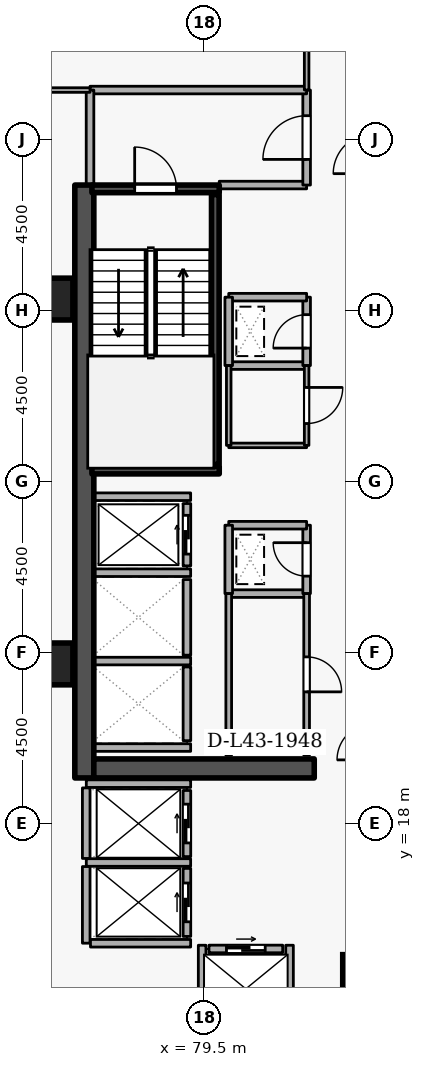
"""IFC4 building model, lengths in metres.
Left out: names, types, materials, properties, quantities, classifications, styles, units other than length and angle.
Written with IfcOpenShell. Run it as: python <this file> out.ifc"""

import sys

from ifc_helpers import new_model, si_unit, direction, frame, frame_2d, origin, origin_2d, place, context, subcontext, project, spatial, rectangle, extrude, element, fill, save


model = new_model("IFC4")
c1 = context("Model", 3, precision=1e-05, world=origin(), true_north=direction((0.0, 1.0)))
c2 = subcontext(c1, "Body", "Model", "MODEL_VIEW")
j1 = project(units=[si_unit("LENGTHUNIT", "METRE"), si_unit("PLANEANGLEUNIT", "RADIAN")], contexts=[c1])
p1 = place(None, origin())
s1 = spatial("IfcSite", under=j1, at=p1, CompositionType="ELEMENT")
p2 = place(p1, origin())
s2 = spatial("IfcBuilding", under=s1, at=p2, CompositionType="ELEMENT")
p3 = place(p2, frame((0.0, 0.0, 163.5)))
s3 = spatial("IfcBuildingStorey", under=s2, at=p3, CompositionType="ELEMENT", Elevation=163.5)
p4 = place(p3, frame((76.35, 19.2, 0.0), z_axis=(0.0, 0.0, 1.0), x_axis=(0.0, 1.0, 0.0)))
e1 = element("IfcWall", 1, at=p4, inside=s3, PredefinedType="SHEAR", context=c2, shape_type="SweptSolid", body=[
    extrude(rectangle(XDim=15.6, YDim=0.5, at=frame_2d((7.8, 0.0))), origin(), (0.0, 0.0, 1.0), 3.6),
])
p5 = place(p3, frame((76.6, 19.45, 0.0), z_axis=(0.0, 0.0, 1.0), x_axis=(1.0, 0.0, 0.0)))
e2 = element("IfcWall", 2, at=p5, inside=s3, PredefinedType="SHEAR", context=c2, shape_type="SweptSolid", body=[
    extrude(rectangle(XDim=5.8, YDim=0.5, at=frame_2d((2.9, 0.0))), origin(), (0.0, 0.0, 1.0), 3.6),
])
for number, where, z_axis, x_axis in (
    (3, (83.7, 14.0, 0.0), (0.0, 0.0, 1.0), (1.0, 0.0, 0.0)),
    (4, (75.5, 22.2, 0.0), (0.0, 0.0, 1.0), (1.0, 0.0, 0.0)),
    (5, (75.5, 31.8, 0.0), (0.0, 0.0, 1.0), (1.0, 0.0, 0.0)),
):
    element("IfcColumn", number, at=place(p3, frame(where, z_axis=z_axis, x_axis=x_axis)), inside=s3, PredefinedType="COLUMN", context=c2, shape_type="SweptSolid", body=[
        extrude(rectangle(XDim=1.1, YDim=1.1, at=origin_2d()), origin(), (0.0, 0.0, 1.0), 3.6),
    ])
p6 = place(p3, frame((79.05, 24.78, 0.0), z_axis=(0.0, 0.0, 1.0), x_axis=(0.0, 1.0, 0.0)))
e6 = element("IfcWall", 6, at=p6, inside=s3, PredefinedType="STANDARD", context=c2, shape_type="SweptSolid", body=[
    extrude(rectangle(XDim=1.64, YDim=0.2, at=frame_2d((0.82, 0.0))), origin(), (0.0, 0.0, 1.0), 3.34),
])
p7 = place(p6, frame((0.31, 0.0, 0.0)))
e7 = element("IfcOpeningElement", 7, at=p7, cuts=e6, PredefinedType="OPENING", context=c2, shape_type="SweptSolid", body=[
    extrude(rectangle(XDim=1.02, YDim=2.06, at=frame_2d((0.51, 1.03))), frame((0.0, 0.11, 0.0), z_axis=(0.0, -1.0, 0.0), x_axis=(1.0, 0.0, 0.0)), (0.0, 0.0, 1.0), 0.22),
])
p8 = place(p3, frame((79.05, 22.43, 0.0), z_axis=(0.0, 0.0, 1.0), x_axis=(0.0, 1.0, 0.0)))
e8 = element("IfcWall", 8, at=p8, inside=s3, PredefinedType="STANDARD", context=c2, shape_type="SweptSolid", body=[
    extrude(rectangle(XDim=1.99, YDim=0.2, at=frame_2d((0.995, 0.0))), origin(), (0.0, 0.0, 1.0), 3.34),
])
p9 = place(p3, frame((79.05, 20.18, 0.0), z_axis=(0.0, 0.0, 1.0), x_axis=(0.0, 1.0, 0.0)))
e9 = element("IfcWall", 9, at=p9, inside=s3, PredefinedType="STANDARD", context=c2, shape_type="SweptSolid", body=[
    extrude(rectangle(XDim=1.94, YDim=0.2, at=frame_2d((0.97, 0.0))), origin(), (0.0, 0.0, 1.0), 3.34),
])
p10 = place(p3, frame((79.05, 17.13, 0.0), z_axis=(0.0, 0.0, 1.0), x_axis=(0.0, 1.0, 0.0)))
e10 = element("IfcWall", 10, at=p10, inside=s3, PredefinedType="STANDARD", context=c2, shape_type="SweptSolid", body=[
    extrude(rectangle(XDim=1.74, YDim=0.2, at=frame_2d((0.87, 0.0))), origin(), (0.0, 0.0, 1.0), 3.34),
])
p11 = place(p10, frame((0.36, 0.0, 0.0)))
e11 = element("IfcOpeningElement", 11, at=p11, cuts=e10, PredefinedType="OPENING", context=c2, shape_type="SweptSolid", body=[
    extrude(rectangle(XDim=1.02, YDim=2.06, at=frame_2d((0.51, 1.03))), frame((0.0, 0.11, 0.0), z_axis=(0.0, -1.0, 0.0), x_axis=(1.0, 0.0, 0.0)), (0.0, 0.0, 1.0), 0.22),
])
p12 = place(p3, frame((79.05, 15.03, 0.0), z_axis=(0.0, 0.0, 1.0), x_axis=(0.0, 1.0, 0.0)))
e12 = element("IfcWall", 12, at=p12, inside=s3, PredefinedType="STANDARD", context=c2, shape_type="SweptSolid", body=[
    extrude(rectangle(XDim=1.79, YDim=0.2, at=frame_2d((0.895, 0.0))), origin(), (0.0, 0.0, 1.0), 3.34),
])
p13 = place(p12, frame((0.385, 0.0, 0.0)))
e13 = element("IfcOpeningElement", 13, at=p13, cuts=e12, PredefinedType="OPENING", context=c2, shape_type="SweptSolid", body=[
    extrude(rectangle(XDim=1.02, YDim=2.06, at=frame_2d((0.51, 1.03))), frame((0.0, 0.11, 0.0), z_axis=(0.0, -1.0, 0.0), x_axis=(1.0, 0.0, 0.0)), (0.0, 0.0, 1.0), 0.22),
])
p14 = place(p3, frame((79.63, 14.7, 0.0), z_axis=(0.0, 0.0, 1.0), x_axis=(1.0, 0.0, 0.0)))
e14 = element("IfcWall", 14, at=p14, inside=s3, PredefinedType="STANDARD", context=c2, shape_type="SweptSolid", body=[
    extrude(rectangle(XDim=1.94, YDim=0.2, at=frame_2d((0.97, 0.0))), origin(), (0.0, 0.0, 1.0), 3.34),
])
p15 = place(p14, frame((0.46, 0.0, 0.0)))
e15 = element("IfcOpeningElement", 15, at=p15, cuts=e14, PredefinedType="OPENING", context=c2, shape_type="SweptSolid", body=[
    extrude(rectangle(XDim=1.02, YDim=2.06, at=frame_2d((0.51, 1.03))), frame((0.0, 0.11, 0.0), z_axis=(0.0, -1.0, 0.0), x_axis=(1.0, 0.0, 0.0)), (0.0, 0.0, 1.0), 0.22),
])
for number, where, z_axis, x_axis in (
    (16, (76.612, 26.6, 0.0), (0.0, 0.0, 1.0), (1.0, 0.0, 0.0)),
    (17, (76.612, 24.6, 0.0), (0.0, 0.0, 1.0), (1.0, 0.0, 0.0)),
    (18, (76.612, 22.275, 0.0), (0.0, 0.0, 1.0), (1.0, 0.0, 0.0)),
    (19, (76.612, 20.0, 0.0), (0.0, 0.0, 1.0), (1.0, 0.0, 0.0)),
):
    element("IfcWall", number, at=place(p3, frame(where, z_axis=z_axis, x_axis=x_axis)), inside=s3, PredefinedType="STANDARD", context=c2, shape_type="SweptSolid", body=[
        extrude(rectangle(XDim=2.536, YDim=0.2, at=frame_2d((1.268, 0.0))), origin(), (0.0, 0.0, 1.0), 3.34),
    ])
p16 = place(p3, frame((76.402, 19.05, 0.0), z_axis=(0.0, 0.0, 1.0), x_axis=(1.0, 0.0, 0.0)))
e20 = element("IfcWall", 20, at=p16, inside=s3, PredefinedType="STANDARD", context=c2, shape_type="SweptSolid", body=[
    extrude(rectangle(XDim=2.746, YDim=0.2, at=frame_2d((1.373, 0.0))), origin(), (0.0, 0.0, 1.0), 2.545),
])
p17 = place(p3, frame((76.402, 16.975, 0.0), z_axis=(0.0, 0.0, 1.0), x_axis=(1.0, 0.0, 0.0)))
e21 = element("IfcWall", 21, at=p17, inside=s3, PredefinedType="STANDARD", context=c2, shape_type="SweptSolid", body=[
    extrude(rectangle(XDim=2.746, YDim=0.2, at=frame_2d((1.373, 0.0))), origin(), (0.0, 0.0, 1.0), 3.34),
])
p18 = place(p3, frame((76.4, 14.852, 0.0), z_axis=(0.0, 0.0, 1.0), x_axis=(0.0, 1.0, 0.0)))
e22 = element("IfcWall", 22, at=p18, inside=s3, PredefinedType="STANDARD", context=c2, shape_type="SweptSolid", body=[
    extrude(rectangle(XDim=2.016, YDim=0.2, at=frame_2d((1.008, 0.0))), origin(), (0.0, 0.0, 1.0), 3.34),
])
p19 = place(p3, frame((76.4, 17.082, 0.0), z_axis=(0.0, 0.0, 1.0), x_axis=(0.0, 1.0, 0.0)))
e23 = element("IfcWall", 23, at=p19, inside=s3, PredefinedType="STANDARD", context=c2, shape_type="SweptSolid", body=[
    extrude(rectangle(XDim=1.856, YDim=0.2, at=frame_2d((0.928, 0.0))), origin(), (0.0, 0.0, 1.0), 3.34),
])
p20 = place(p3, frame((76.512, 14.85, 0.0), z_axis=(0.0, 0.0, 1.0), x_axis=(1.0, 0.0, 0.0)))
e24 = element("IfcWall", 24, at=p20, inside=s3, PredefinedType="STANDARD", context=c2, shape_type="SweptSolid", body=[
    extrude(rectangle(XDim=2.636, YDim=0.2, at=frame_2d((1.318, 0.0))), origin(), (0.0, 0.0, 1.0), 3.34),
])
for number, where, z_axis, x_axis in (
    (25, (81.75, 12.612, 0.0), (0.0, 0.0, 1.0), (0.0, 1.0, 0.0)),
    (26, (79.45, 12.612, 0.0), (0.0, 0.0, 1.0), (0.0, 1.0, 0.0)),
):
    element("IfcWall", number, at=place(p3, frame(where, z_axis=z_axis, x_axis=x_axis)), inside=s3, PredefinedType="STANDARD", context=c2, shape_type="SweptSolid", body=[
        extrude(rectangle(XDim=2.186, YDim=0.2, at=frame_2d((1.093, 0.0))), origin(), (0.0, 0.0, 1.0), 3.34),
    ])
p21 = place(p3, frame((76.55, 34.7, 0.0), z_axis=(0.0, 0.0, 1.0), x_axis=(1.0, 0.0, 0.0)))
e27 = element("IfcWall", 27, at=p21, inside=s3, PredefinedType="SHEAR", context=c2, shape_type="SweptSolid", body=[
    extrude(rectangle(XDim=3.35, YDim=0.2, at=frame_2d((1.675, 0.0))), origin(), (0.0, 0.0, 1.0), 3.6),
])
p22 = place(p21, frame((1.125, 0.0, 0.0)))
e28 = element("IfcOpeningElement", 28, at=p22, cuts=e27, PredefinedType="OPENING", context=c2, shape_type="SweptSolid", body=[
    extrude(rectangle(XDim=1.1, YDim=2.1, at=frame_2d((0.55, 1.05))), frame((0.0, 0.11, 0.0), z_axis=(0.0, -1.0, 0.0), x_axis=(1.0, 0.0, 0.0)), (0.0, 0.0, 1.0), 0.22),
])
p23 = place(p3, frame((79.9, 27.3, 0.0), z_axis=(0.0, 0.0, 1.0), x_axis=(-1.0, 0.0, 0.0)))
e29 = element("IfcWall", 29, at=p23, inside=s3, PredefinedType="SHEAR", context=c2, shape_type="SweptSolid", body=[
    extrude(rectangle(XDim=3.35, YDim=0.2, at=frame_2d((1.675, 0.0))), origin(), (0.0, 0.0, 1.0), 3.6),
])
p24 = place(p3, frame((79.797, 27.45, 0.0), z_axis=(0.0, 0.0, 1.0), x_axis=(0.0, 1.0, 0.0)))
e30 = element("IfcWall", 30, at=p24, inside=s3, PredefinedType="SHEAR", context=c2, shape_type="SweptSolid", body=[
    extrude(rectangle(XDim=7.1, YDim=0.2, at=frame_2d((3.55, 0.0))), origin(), (0.0, 0.0, 1.0), 3.6),
])
p25 = place(p3, frame((79.9, 34.8, 0.0), z_axis=(0.0, 0.0, 1.0), x_axis=(1.0, 0.0, 0.0)))
e31 = element("IfcWall", 31, at=p25, inside=s3, PredefinedType="STANDARD", context=c2, shape_type="SweptSolid", body=[
    extrude(rectangle(XDim=2.3, YDim=0.2, at=frame_2d((1.15, 0.0))), origin(), (0.0, 0.0, 1.0), 2.545),
])
p26 = place(p3, frame((82.2, 34.8, 0.0), z_axis=(0.0, 0.0, 1.0), x_axis=(0.0, 1.0, 0.0)))
e32 = element("IfcWall", 32, at=p26, inside=s3, PredefinedType="STANDARD", context=c2, shape_type="SweptSolid", body=[
    extrude(rectangle(XDim=2.5, YDim=0.2, at=frame_2d((1.25, 0.0))), origin(), (0.0, 0.0, 1.0), 3.34),
])
p27 = place(p26, frame((0.675, 0.0, 0.0)))
e33 = element("IfcOpeningElement", 33, at=p27, cuts=e32, PredefinedType="OPENING", context=c2, shape_type="SweptSolid", body=[
    extrude(rectangle(XDim=1.15, YDim=2.1, at=frame_2d((0.575, 1.05))), frame((0.0, 0.11, 0.0), z_axis=(0.0, -1.0, 0.0), x_axis=(1.0, 0.0, 0.0)), (0.0, 0.0, 1.0), 0.22),
])
p28 = place(p3, frame((82.2, 37.3, 0.0), z_axis=(0.0, 0.0, 1.0), x_axis=(-1.0, 0.0, 0.0)))
e34 = element("IfcWall", 34, at=p28, inside=s3, PredefinedType="STANDARD", context=c2, shape_type="SweptSolid", body=[
    extrude(rectangle(XDim=5.7, YDim=0.2, at=frame_2d((2.85, 0.0))), origin(), (0.0, 0.0, 1.0), 3.34),
])
p29 = place(p3, frame((76.5, 37.3, 0.0), z_axis=(0.0, 0.0, 1.0), x_axis=(0.0, -1.0, 0.0)))
e35 = element("IfcWall", 35, at=p29, inside=s3, PredefinedType="STANDARD", context=c2, shape_type="SweptSolid", body=[
    extrude(rectangle(XDim=2.5, YDim=0.2, at=frame_2d((1.25, 0.0))), origin(), (0.0, 0.0, 1.0), 3.34),
])
p30 = place(p3, frame((80.15, 24.05, 0.0), z_axis=(0.0, 0.0, 1.0), x_axis=(1.0, 0.0, 0.0)))
e36 = element("IfcWall", 36, at=p30, inside=s3, PredefinedType="STANDARD", context=c2, shape_type="SweptSolid", body=[
    extrude(rectangle(XDim=2.05, YDim=0.2, at=frame_2d((1.025, 0.0))), origin(), (0.0, 0.0, 1.0), 3.34),
])
p31 = place(p3, frame((82.2, 24.05, 0.0), z_axis=(0.0, 0.0, 1.0), x_axis=(0.0, 1.0, 0.0)))
e37 = element("IfcWall", 37, at=p31, inside=s3, PredefinedType="STANDARD", context=c2, shape_type="SweptSolid", body=[
    extrude(rectangle(XDim=1.8, YDim=0.2, at=frame_2d((0.9, 0.0))), origin(), (0.0, 0.0, 1.0), 3.34),
])
p32 = place(p31, frame((0.46, 0.0, 0.0)))
e38 = element("IfcOpeningElement", 38, at=p32, cuts=e37, PredefinedType="OPENING", context=c2, shape_type="SweptSolid", body=[
    extrude(rectangle(XDim=0.88, YDim=2.04, at=frame_2d((0.44, 1.02))), frame((0.0, 0.11, 0.0), z_axis=(0.0, -1.0, 0.0), x_axis=(1.0, 0.0, 0.0)), (0.0, 0.0, 1.0), 0.22),
])
p33 = place(p3, frame((82.2, 25.85, 0.0), z_axis=(0.0, 0.0, 1.0), x_axis=(-1.0, 0.0, 0.0)))
e39 = element("IfcWall", 39, at=p33, inside=s3, PredefinedType="STANDARD", context=c2, shape_type="SweptSolid", body=[
    extrude(rectangle(XDim=2.05, YDim=0.2, at=frame_2d((1.025, 0.0))), origin(), (0.0, 0.0, 1.0), 3.34),
])
p34 = place(p3, frame((80.15, 25.85, 0.0), z_axis=(0.0, 0.0, 1.0), x_axis=(0.0, -1.0, 0.0)))
e40 = element("IfcWall", 40, at=p34, inside=s3, PredefinedType="STANDARD", context=c2, shape_type="SweptSolid", body=[
    extrude(rectangle(XDim=1.8, YDim=0.2, at=frame_2d((0.9, 0.0))), origin(), (0.0, 0.0, 1.0), 3.34),
])
p35 = place(p3, frame((80.15, 30.05, 0.0), z_axis=(0.0, 0.0, 1.0), x_axis=(1.0, 0.0, 0.0)))
e41 = element("IfcWall", 41, at=p35, inside=s3, PredefinedType="STANDARD", context=c2, shape_type="SweptSolid", body=[
    extrude(rectangle(XDim=2.05, YDim=0.2, at=frame_2d((1.025, 0.0))), origin(), (0.0, 0.0, 1.0), 3.34),
])
p36 = place(p3, frame((82.2, 30.05, 0.0), z_axis=(0.0, 0.0, 1.0), x_axis=(0.0, 1.0, 0.0)))
e42 = element("IfcWall", 42, at=p36, inside=s3, PredefinedType="STANDARD", context=c2, shape_type="SweptSolid", body=[
    extrude(rectangle(XDim=1.8, YDim=0.2, at=frame_2d((0.9, 0.0))), origin(), (0.0, 0.0, 1.0), 3.34),
])
p37 = place(p36, frame((0.46, 0.0, 0.0)))
e43 = element("IfcOpeningElement", 43, at=p37, cuts=e42, PredefinedType="OPENING", context=c2, shape_type="SweptSolid", body=[
    extrude(rectangle(XDim=0.88, YDim=2.04, at=frame_2d((0.44, 1.02))), frame((0.0, 0.11, 0.0), z_axis=(0.0, -1.0, 0.0), x_axis=(1.0, 0.0, 0.0)), (0.0, 0.0, 1.0), 0.22),
])
p38 = place(p3, frame((82.2, 31.85, 0.0), z_axis=(0.0, 0.0, 1.0), x_axis=(-1.0, 0.0, 0.0)))
e44 = element("IfcWall", 44, at=p38, inside=s3, PredefinedType="STANDARD", context=c2, shape_type="SweptSolid", body=[
    extrude(rectangle(XDim=2.05, YDim=0.2, at=frame_2d((1.025, 0.0))), origin(), (0.0, 0.0, 1.0), 3.34),
])
p39 = place(p3, frame((80.15, 31.85, 0.0), z_axis=(0.0, 0.0, 1.0), x_axis=(0.0, -1.0, 0.0)))
e45 = element("IfcWall", 45, at=p39, inside=s3, PredefinedType="STANDARD", context=c2, shape_type="SweptSolid", body=[
    extrude(rectangle(XDim=1.8, YDim=0.2, at=frame_2d((0.9, 0.0))), origin(), (0.0, 0.0, 1.0), 3.34),
])
p40 = place(p3, frame((80.15, 19.8, 0.0), z_axis=(0.0, 0.0, 1.0), x_axis=(0.0, 1.0, 0.0)))
e46 = element("IfcWall", 46, at=p40, inside=s3, PredefinedType="PARTITIONING", context=c2, shape_type="SweptSolid", body=[
    extrude(rectangle(XDim=4.25, YDim=0.15, at=frame_2d((2.125, 0.0))), origin(), (0.0, 0.0, 1.0), 3.34),
])
p41 = place(p3, frame((82.2, 24.05, 0.0), z_axis=(0.0, 0.0, 1.0), x_axis=(0.0, -1.0, 0.0)))
e47 = element("IfcWall", 47, at=p41, inside=s3, PredefinedType="PARTITIONING", context=c2, shape_type="SweptSolid", body=[
    extrude(rectangle(XDim=4.25, YDim=0.15, at=frame_2d((2.125, 0.0))), origin(), (0.0, 0.0, 1.0), 3.34),
])
p42 = place(p41, frame((1.665, 0.0, 0.0)))
e48 = element("IfcOpeningElement", 48, at=p42, cuts=e47, PredefinedType="OPENING", context=c2, shape_type="SweptSolid", body=[
    extrude(rectangle(XDim=0.92, YDim=2.08, at=frame_2d((0.46, 1.04))), frame((0.0, 0.085, 0.0), z_axis=(0.0, -1.0, 0.0), x_axis=(1.0, 0.0, 0.0)), (0.0, 0.0, 1.0), 0.17),
])
p43 = place(p3, frame((82.2, 27.95, 0.0), z_axis=(0.0, 0.0, 1.0), x_axis=(-1.0, 0.0, 0.0)))
e49 = element("IfcWall", 49, at=p43, inside=s3, PredefinedType="PARTITIONING", context=c2, shape_type="SweptSolid", body=[
    extrude(rectangle(XDim=2.05, YDim=0.12, at=frame_2d((1.025, 0.0))), origin(), (0.0, 0.0, 1.0), 3.34),
])
p44 = place(p3, frame((80.15, 27.95, 0.0), z_axis=(0.0, 0.0, 1.0), x_axis=(0.0, 1.0, 0.0)))
e50 = element("IfcWall", 50, at=p44, inside=s3, PredefinedType="PARTITIONING", context=c2, shape_type="SweptSolid", body=[
    extrude(rectangle(XDim=2.1, YDim=0.12, at=frame_2d((1.05, 0.0))), origin(), (0.0, 0.0, 1.0), 3.34),
])
p45 = place(p3, frame((82.2, 30.05, 0.0), z_axis=(0.0, 0.0, 1.0), x_axis=(0.0, -1.0, 0.0)))
e51 = element("IfcWall", 51, at=p45, inside=s3, PredefinedType="PARTITIONING", context=c2, shape_type="SweptSolid", body=[
    extrude(rectangle(XDim=2.1, YDim=0.12, at=frame_2d((1.05, 0.0))), origin(), (0.0, 0.0, 1.0), 3.34),
])
p46 = place(p45, frame((0.575, 0.0, 0.0)))
e52 = element("IfcOpeningElement", 52, at=p46, cuts=e51, PredefinedType="OPENING", context=c2, shape_type="SweptSolid", body=[
    extrude(rectangle(XDim=0.95, YDim=2.1, at=frame_2d((0.475, 1.05))), frame((0.0, 0.07, 0.0), z_axis=(0.0, -1.0, 0.0), x_axis=(1.0, 0.0, 0.0)), (0.0, 0.0, 1.0), 0.14),
])
p47 = place(p3, frame((82.2, 39.25, 0.0), z_axis=(0.0, 0.0, 1.0), x_axis=(0.0, -1.0, 0.0)))
e53 = element("IfcWall", 53, at=p47, inside=s3, PredefinedType="PARTITIONING", context=c2, shape_type="SweptSolid", body=[
    extrude(rectangle(XDim=1.95, YDim=0.12, at=frame_2d((0.975, 0.0))), origin(), (0.0, 0.0, 1.0), 3.34),
])
p48 = place(p3, frame((76.5, 37.3, 0.0), z_axis=(0.0, 0.0, 1.0), x_axis=(-1.0, 0.0, 0.0)))
e54 = element("IfcWall", 54, at=p48, inside=s3, PredefinedType="PARTITIONING", context=c2, shape_type="SweptSolid", body=[
    extrude(rectangle(XDim=5.72, YDim=0.12, at=frame_2d((2.86, 0.0))), origin(), (0.0, 0.0, 1.0), 3.34),
])
p49 = place(p7, origin())
e55 = element("IfcDoor", 55, at=p49, inside=s3, OperationType="SLIDING_TO_LEFT", PredefinedType="DOOR", context=c2, shape_type="SweptSolid", body=[
    extrude(rectangle(XDim=1.02, YDim=2.06, at=frame_2d((0.51, 1.03))), frame((0.0, 0.025, 0.0), z_axis=(0.0, -1.0, 0.0), x_axis=(1.0, 0.0, 0.0)), (0.0, 0.0, 1.0), 0.05),
])
fill(e7, e55)
p50 = place(p11, origin())
e56 = element("IfcDoor", 56, at=p50, inside=s3, OperationType="SLIDING_TO_LEFT", PredefinedType="DOOR", context=c2, shape_type="SweptSolid", body=[
    extrude(rectangle(XDim=1.02, YDim=2.06, at=frame_2d((0.51, 1.03))), frame((0.0, 0.025, 0.0), z_axis=(0.0, -1.0, 0.0), x_axis=(1.0, 0.0, 0.0)), (0.0, 0.0, 1.0), 0.05),
])
fill(e11, e56)
p51 = place(p13, origin())
e57 = element("IfcDoor", 57, at=p51, inside=s3, OperationType="SLIDING_TO_LEFT", PredefinedType="DOOR", context=c2, shape_type="SweptSolid", body=[
    extrude(rectangle(XDim=1.02, YDim=2.06, at=frame_2d((0.51, 1.03))), frame((0.0, 0.025, 0.0), z_axis=(0.0, -1.0, 0.0), x_axis=(1.0, 0.0, 0.0)), (0.0, 0.0, 1.0), 0.05),
])
fill(e13, e57)
p52 = place(p15, origin())
e58 = element("IfcDoor", 58, at=p52, inside=s3, OperationType="SLIDING_TO_LEFT", PredefinedType="DOOR", context=c2, shape_type="SweptSolid", body=[
    extrude(rectangle(XDim=1.02, YDim=2.06, at=frame_2d((0.51, 1.03))), frame((0.0, 0.025, 0.0), z_axis=(0.0, -1.0, 0.0), x_axis=(1.0, 0.0, 0.0)), (0.0, 0.0, 1.0), 0.05),
])
fill(e15, e58)
p53 = place(p22, origin())
e59 = element("IfcDoor", 59, at=p53, inside=s3, OperationType="SINGLE_SWING_LEFT", PredefinedType="DOOR", context=c2, shape_type="SweptSolid", body=[
    extrude(rectangle(XDim=1.1, YDim=2.1, at=frame_2d((0.55, 1.05))), frame((0.0, 0.025, 0.0), z_axis=(0.0, -1.0, 0.0), x_axis=(1.0, 0.0, 0.0)), (0.0, 0.0, 1.0), 0.05),
])
fill(e28, e59)
p54 = place(p27, origin())
e60 = element("IfcDoor", 60, at=p54, inside=s3, OperationType="SINGLE_SWING_LEFT", PredefinedType="DOOR", context=c2, shape_type="SweptSolid", body=[
    extrude(rectangle(XDim=1.15, YDim=2.1, at=frame_2d((0.575, 1.05))), frame((0.0, 0.025, 0.0), z_axis=(0.0, -1.0, 0.0), x_axis=(1.0, 0.0, 0.0)), (0.0, 0.0, 1.0), 0.05),
])
fill(e33, e60)
p55 = place(p32, origin())
e61 = element("IfcDoor", 61, at=p55, inside=s3, OperationType="SINGLE_SWING_RIGHT", PredefinedType="DOOR", context=c2, shape_type="SweptSolid", body=[
    extrude(rectangle(XDim=0.88, YDim=2.04, at=frame_2d((0.44, 1.02))), frame((0.0, 0.025, 0.0), z_axis=(0.0, -1.0, 0.0), x_axis=(1.0, 0.0, 0.0)), (0.0, 0.0, 1.0), 0.05),
])
fill(e38, e61)
p56 = place(p37, origin())
e62 = element("IfcDoor", 62, at=p56, inside=s3, OperationType="SINGLE_SWING_LEFT", PredefinedType="DOOR", context=c2, shape_type="SweptSolid", body=[
    extrude(rectangle(XDim=0.88, YDim=2.04, at=frame_2d((0.44, 1.02))), frame((0.0, 0.025, 0.0), z_axis=(0.0, -1.0, 0.0), x_axis=(1.0, 0.0, 0.0)), (0.0, 0.0, 1.0), 0.05),
])
fill(e43, e62)
p57 = place(p42, origin())
e63 = element("IfcDoor", 63, at=p57, inside=s3, OperationType="SINGLE_SWING_RIGHT", PredefinedType="DOOR", context=c2, shape_type="SweptSolid", body=[
    extrude(rectangle(XDim=0.92, YDim=2.08, at=frame_2d((0.46, 1.04))), frame((0.0, 0.025, 0.0), z_axis=(0.0, -1.0, 0.0), x_axis=(1.0, 0.0, 0.0)), (0.0, 0.0, 1.0), 0.05),
])
fill(e48, e63)
p58 = place(p46, origin())
e64 = element("IfcDoor", 64, at=p58, inside=s3, OperationType="SINGLE_SWING_LEFT", PredefinedType="DOOR", context=c2, shape_type="SweptSolid", body=[
    extrude(rectangle(XDim=0.95, YDim=2.1, at=frame_2d((0.475, 1.05))), frame((0.0, 0.025, 0.0), z_axis=(0.0, -1.0, 0.0), x_axis=(1.0, 0.0, 0.0)), (0.0, 0.0, 1.0), 0.05),
])
fill(e52, e64)
save(model, sys.argv[1])
